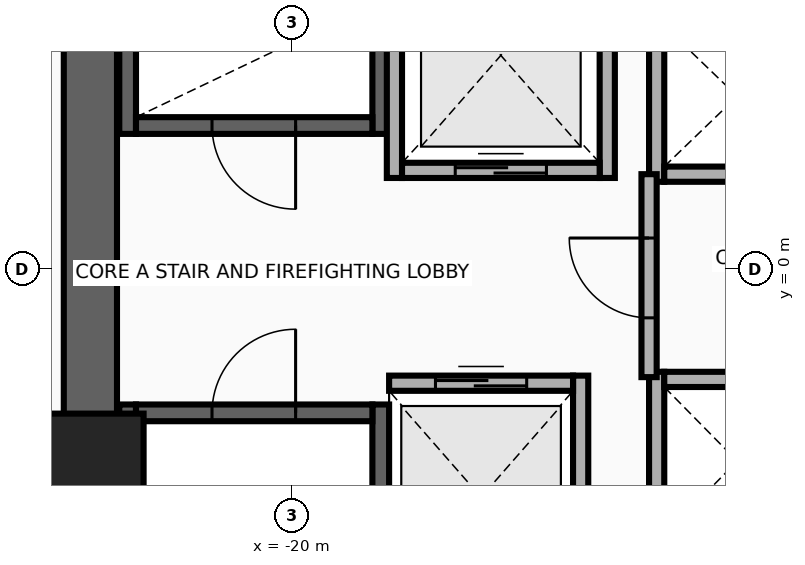
"""IFC4 building model, lengths in metres.
Left out: names, types, materials, properties, quantities, classifications, styles, units other than length and angle.
Written with IfcOpenShell. Run it as: python <this file> out.ifc"""

import sys

from ifc_helpers import new_model, si_unit, direction, frame, frame_2d, origin, origin_2d, place, context, subcontext, project, spatial, rectangle, extrude, source, transform, mapped, element, fill, save


model = new_model("IFC4")
c1 = context("Model", 3, precision=1e-05, world=origin(), true_north=direction((0.0, 1.0)))
c2 = subcontext(c1, "Body", "Model", "MODEL_VIEW")
j1 = project(units=[si_unit("LENGTHUNIT", "METRE"), si_unit("PLANEANGLEUNIT", "RADIAN")], contexts=[c1])
p1 = place(None, origin())
s1 = spatial("IfcSite", under=j1, at=p1, CompositionType="ELEMENT")
p2 = place(p1, origin())
s2 = spatial("IfcBuilding", under=s1, at=p2, CompositionType="ELEMENT")
p3 = place(p2, frame((0.0, 0.0, 59.3)))
s3 = spatial("IfcBuildingStorey", under=s2, at=p3, CompositionType="ELEMENT", Elevation=59.3)
for number, where, z_axis, x_axis in (
    (1, (-22.16, 1.78, 0.0), (0.0, 0.0, 1.0), (0.0, 1.0, 0.0)),
    (2, (-18.83, 1.78, 0.0), (0.0, 0.0, 1.0), (0.0, 1.0, 0.0)),
):
    element("IfcWall", number, at=place(p3, frame(where, z_axis=z_axis, x_axis=x_axis)), inside=s3, PredefinedType="SHEAR", context=c2, shape_type="SweptSolid", body=[
        extrude(rectangle(XDim=8.67, YDim=0.22, at=frame_2d((4.335, 0.0))), origin(), (0.0, 0.0, 1.0), 3.46),
    ])
p4 = place(p3, frame((-22.05, 1.89, 0.0), z_axis=(0.0, 0.0, 1.0), x_axis=(1.0, 0.0, 0.0)))
e3 = element("IfcWall", 3, at=p4, inside=s3, PredefinedType="SHEAR", context=c2, shape_type="SweptSolid", body=[
    extrude(rectangle(XDim=3.11, YDim=0.22, at=frame_2d((1.555, 0.0))), origin(), (0.0, 0.0, 1.0), 3.46),
])
p5 = place(p4, frame((1.0, 0.0, 0.0)))
e4 = element("IfcOpeningElement", 4, at=p5, cuts=e3, PredefinedType="OPENING", context=c2, shape_type="SweptSolid", body=[
    extrude(rectangle(XDim=1.1, YDim=2.15, at=frame_2d((0.55, 1.075))), frame((0.0, 0.125, 0.0), z_axis=(0.0, -1.0, 0.0), x_axis=(1.0, 0.0, 0.0)), (0.0, 0.0, 1.0), 0.25),
])
for number, where, z_axis, x_axis in (
    (5, (-22.16, -10.45, 0.0), (0.0, 0.0, 1.0), (0.0, 1.0, 0.0)),
    (6, (-18.83, -10.45, 0.0), (0.0, 0.0, 1.0), (0.0, 1.0, 0.0)),
):
    element("IfcWall", number, at=place(p3, frame(where, z_axis=z_axis, x_axis=x_axis)), inside=s3, PredefinedType="SHEAR", context=c2, shape_type="SweptSolid", body=[
        extrude(rectangle(XDim=8.67, YDim=0.22, at=frame_2d((4.335, 0.0))), origin(), (0.0, 0.0, 1.0), 3.46),
    ])
p6 = place(p3, frame((-22.05, -1.89, 0.0), z_axis=(0.0, 0.0, 1.0), x_axis=(1.0, 0.0, 0.0)))
e7 = element("IfcWall", 7, at=p6, inside=s3, PredefinedType="SHEAR", context=c2, shape_type="SweptSolid", body=[
    extrude(rectangle(XDim=3.11, YDim=0.22, at=frame_2d((1.555, 0.0))), origin(), (0.0, 0.0, 1.0), 3.46),
])
p7 = place(p6, frame((1.0, 0.0, 0.0)))
e8 = element("IfcOpeningElement", 8, at=p7, cuts=e7, PredefinedType="OPENING", context=c2, shape_type="SweptSolid", body=[
    extrude(rectangle(XDim=1.1, YDim=2.15, at=frame_2d((0.55, 1.075))), frame((0.0, 0.125, 0.0), z_axis=(0.0, -1.0, 0.0), x_axis=(1.0, 0.0, 0.0)), (0.0, 0.0, 1.0), 0.25),
])
p8 = place(p3, frame((-22.65, -11.15, 0.0), z_axis=(0.0, 0.0, 1.0), x_axis=(0.0, 1.0, 0.0)))
e9 = element("IfcWall", 9, at=p8, inside=s3, PredefinedType="SHEAR", context=c2, shape_type="SweptSolid", body=[
    extrude(rectangle(XDim=22.3, YDim=0.7, at=frame_2d((11.15, 0.0))), origin(), (0.0, 0.0, 1.0), 3.46),
])
m1 = source(origin(), c2, "Body", "SweptSolid", [
    extrude(rectangle(XDim=1.4, YDim=1.4, at=origin_2d()), origin(), (0.0, 0.0, 1.0), 3.7),
])
p9 = place(p3, frame((-22.65, -2.6, 0.0), z_axis=(0.0, 0.0, 1.0), x_axis=(1.0, 0.0, 0.0)))
e10 = element("IfcColumn", 10, at=p9, inside=s3, PredefinedType="COLUMN", context=c2, shape_type="MappedRepresentation", body=[
    mapped(m1, transform((0.0, 0.0, 0.0), x_axis=(1.0, 0.0, 0.0), y_axis=(0.0, 1.0, 0.0), z_axis=(0.0, 0.0, 1.0), scale=1.0)),
])
for number, where, z_axis, x_axis in (
    (11, (-18.65, 1.2, 0.0), (0.0, 0.0, 1.0), (0.0, 1.0, 0.0)),
    (12, (-15.85, 1.2, 0.0), (0.0, 0.0, 1.0), (0.0, 1.0, 0.0)),
):
    element("IfcWall", number, at=place(p3, frame(where, z_axis=z_axis, x_axis=x_axis)), inside=s3, PredefinedType="MOVABLE", context=c2, shape_type="SweptSolid", body=[
        extrude(rectangle(XDim=3.225, YDim=0.2, at=frame_2d((1.613, 0.0))), origin(), (0.0, 0.0, 1.0), 3.46),
    ])
p10 = place(p3, frame((-18.55, 1.3, 0.0), z_axis=(0.0, 0.0, 1.0), x_axis=(1.0, 0.0, 0.0)))
e13 = element("IfcWall", 13, at=p10, inside=s3, PredefinedType="MOVABLE", context=c2, shape_type="SweptSolid", body=[
    extrude(rectangle(XDim=2.6, YDim=0.2, at=frame_2d((1.3, 0.0))), origin(), (0.0, 0.0, 1.0), 3.46),
])
p11 = place(p10, frame((0.7, 0.0, 0.0)))
e14 = element("IfcOpeningElement", 14, at=p11, cuts=e13, PredefinedType="OPENING", context=c2, shape_type="SweptSolid", body=[
    extrude(rectangle(XDim=1.2, YDim=2.1, at=frame_2d((0.6, 1.05))), frame((0.0, 0.115, 0.0), z_axis=(0.0, -1.0, 0.0), x_axis=(1.0, 0.0, 0.0)), (0.0, 0.0, 1.0), 0.23),
])
p12 = place(p3, frame((-16.2, -4.6, 0.0), z_axis=(0.0, 0.0, 1.0), x_axis=(0.0, 1.0, 0.0)))
e15 = element("IfcWall", 15, at=p12, inside=s3, PredefinedType="MOVABLE", context=c2, shape_type="SweptSolid", body=[
    extrude(rectangle(XDim=3.2, YDim=0.2, at=frame_2d((1.6, 0.0))), origin(), (0.0, 0.0, 1.0), 3.46),
])
p13 = place(p3, frame((-18.72, -1.5, 0.0), z_axis=(0.0, 0.0, 1.0), x_axis=(1.0, 0.0, 0.0)))
e16 = element("IfcWall", 16, at=p13, inside=s3, PredefinedType="MOVABLE", context=c2, shape_type="SweptSolid", body=[
    extrude(rectangle(XDim=2.42, YDim=0.2, at=frame_2d((1.21, 0.0))), origin(), (0.0, 0.0, 1.0), 3.46),
])
p14 = place(p13, frame((0.61, 0.0, 0.0)))
e17 = element("IfcOpeningElement", 17, at=p14, cuts=e16, PredefinedType="OPENING", context=c2, shape_type="SweptSolid", body=[
    extrude(rectangle(XDim=1.2, YDim=2.1, at=frame_2d((0.6, 1.05))), frame((0.0, 0.115, 0.0), z_axis=(0.0, -1.0, 0.0), x_axis=(1.0, 0.0, 0.0)), (0.0, 0.0, 1.0), 0.23),
])
p15 = place(p3, frame((-15.2, 1.15, 0.0), z_axis=(0.0, 0.0, 1.0), x_axis=(0.0, 1.0, 0.0)))
e18 = element("IfcWall", 18, at=p15, inside=s3, PredefinedType="MOVABLE", context=c2, shape_type="SweptSolid", body=[
    extrude(rectangle(XDim=2.25, YDim=0.2, at=frame_2d((1.125, 0.0))), origin(), (0.0, 0.0, 1.0), 3.46),
])
p16 = place(p3, frame((-15.1, 1.25, 0.0), z_axis=(0.0, 0.0, 1.0), x_axis=(1.0, 0.0, 0.0)))
e19 = element("IfcWall", 19, at=p16, inside=s3, PredefinedType="MOVABLE", context=c2, shape_type="SweptSolid", body=[
    extrude(rectangle(XDim=1.92, YDim=0.2, at=frame_2d((0.96, 0.0))), origin(), (0.0, 0.0, 1.0), 3.46),
])
p17 = place(p3, frame((-15.2, -3.7, 0.0), z_axis=(0.0, 0.0, 1.0), x_axis=(0.0, 1.0, 0.0)))
e20 = element("IfcWall", 20, at=p17, inside=s3, PredefinedType="MOVABLE", context=c2, shape_type="SweptSolid", body=[
    extrude(rectangle(XDim=2.35, YDim=0.2, at=frame_2d((1.175, 0.0))), origin(), (0.0, 0.0, 1.0), 3.46),
])
p18 = place(p3, frame((-15.1, -1.45, 0.0), z_axis=(0.0, 0.0, 1.0), x_axis=(1.0, 0.0, 0.0)))
e21 = element("IfcWall", 21, at=p18, inside=s3, PredefinedType="MOVABLE", context=c2, shape_type="SweptSolid", body=[
    extrude(rectangle(XDim=1.92, YDim=0.2, at=frame_2d((0.96, 0.0))), origin(), (0.0, 0.0, 1.0), 3.46),
])
p19 = place(p3, frame((-15.3, -1.42, 0.0), z_axis=(0.0, 0.0, 1.0), x_axis=(0.0, 1.0, 0.0)))
e22 = element("IfcWall", 22, at=p19, inside=s3, PredefinedType="PARTITIONING", context=c2, shape_type="SweptSolid", body=[
    extrude(rectangle(XDim=2.67, YDim=0.2, at=frame_2d((1.335, 0.0))), origin(), (0.0, 0.0, 1.0), 3.46),
])
p20 = place(p19, frame((0.78, 0.0, 0.0)))
e23 = element("IfcOpeningElement", 23, at=p20, cuts=e22, PredefinedType="OPENING", context=c2, shape_type="SweptSolid", body=[
    extrude(rectangle(XDim=1.05, YDim=2.15, at=frame_2d((0.525, 1.075))), frame((0.0, 0.115, 0.0), z_axis=(0.0, -1.0, 0.0), x_axis=(1.0, 0.0, 0.0)), (0.0, 0.0, 1.0), 0.23),
])
p21 = place(p11, origin())
e24 = element("IfcDoor", 24, at=p21, inside=s3, OperationType="DOUBLE_DOOR_SLIDING", PredefinedType="DOOR", context=c2, shape_type="SweptSolid", body=[
    extrude(rectangle(XDim=1.2, YDim=2.1, at=frame_2d((0.6, 1.05))), frame((0.0, 0.025, 0.0), z_axis=(0.0, -1.0, 0.0), x_axis=(1.0, 0.0, 0.0)), (0.0, 0.0, 1.0), 0.05),
])
fill(e14, e24)
p22 = place(p14, origin())
e25 = element("IfcDoor", 25, at=p22, inside=s3, OperationType="DOUBLE_DOOR_SLIDING", PredefinedType="DOOR", context=c2, shape_type="SweptSolid", body=[
    extrude(rectangle(XDim=1.2, YDim=2.1, at=frame_2d((0.6, 1.05))), frame((0.0, 0.025, 0.0), z_axis=(0.0, -1.0, 0.0), x_axis=(1.0, 0.0, 0.0)), (0.0, 0.0, 1.0), 0.05),
])
fill(e17, e25)
p23 = place(p20, origin())
e26 = element("IfcDoor", 26, at=p23, inside=s3, OperationType="SINGLE_SWING_RIGHT", PredefinedType="DOOR", context=c2, shape_type="SweptSolid", body=[
    extrude(rectangle(XDim=1.05, YDim=2.15, at=frame_2d((0.525, 1.075))), frame((0.0, 0.025, 0.0), z_axis=(0.0, -1.0, 0.0), x_axis=(1.0, 0.0, 0.0)), (0.0, 0.0, 1.0), 0.05),
])
fill(e23, e26)
p24 = place(p5, frame((1.1, 0.0, 0.0), z_axis=(0.0, 0.0, 1.0), x_axis=(-1.0, 0.0, 0.0)))
e27 = element("IfcDoor", 27, at=p24, inside=s3, OperationType="SINGLE_SWING_LEFT", PredefinedType="DOOR", context=c2, shape_type="SweptSolid", body=[
    extrude(rectangle(XDim=1.1, YDim=2.15, at=frame_2d((0.55, 1.075))), frame((0.0, 0.025, 0.0), z_axis=(0.0, -1.0, 0.0), x_axis=(1.0, 0.0, 0.0)), (0.0, 0.0, 1.0), 0.05),
])
fill(e4, e27)
p25 = place(p7, origin())
e28 = element("IfcDoor", 28, at=p25, inside=s3, OperationType="SINGLE_SWING_RIGHT", PredefinedType="DOOR", context=c2, shape_type="SweptSolid", body=[
    extrude(rectangle(XDim=1.1, YDim=2.15, at=frame_2d((0.55, 1.075))), frame((0.0, 0.025, 0.0), z_axis=(0.0, -1.0, 0.0), x_axis=(1.0, 0.0, 0.0)), (0.0, 0.0, 1.0), 0.05),
])
fill(e8, e28)
save(model, sys.argv[1])
